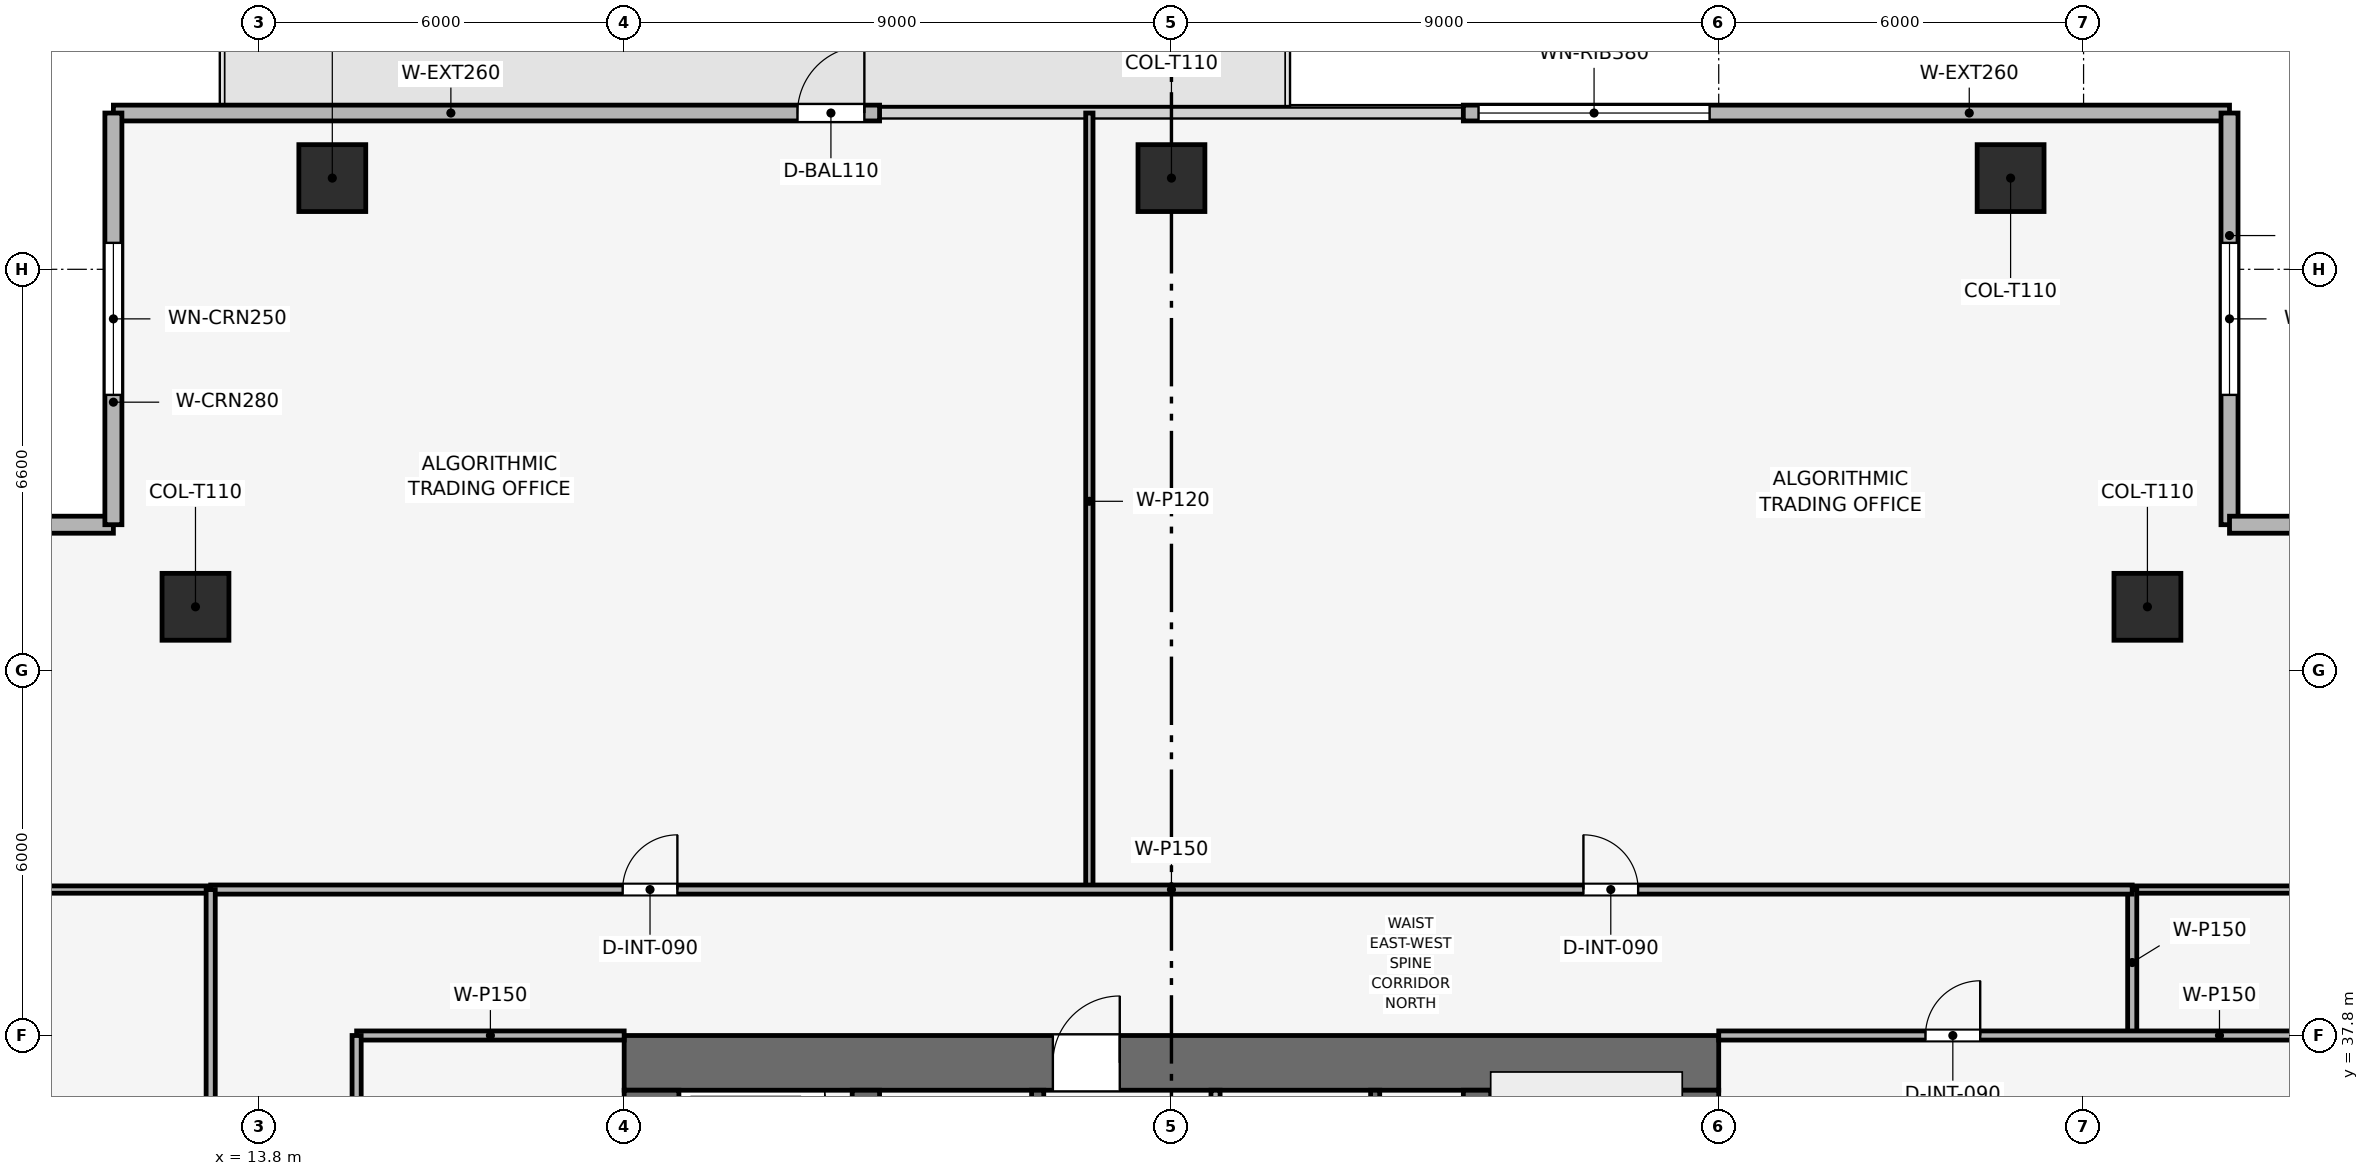
"""IFC4 building model, lengths in metres.
Left out: names, types, materials, properties, quantities, classifications, styles, units other than length and angle.
Written with IfcOpenShell. Run it as: python <this file> out.ifc"""

import sys

from ifc_helpers import new_model, si_unit, direction, frame, frame_2d, origin, origin_2d, place, context, subcontext, project, spatial, rectangle, extrude, element, fill, save


model = new_model("IFC4")
c1 = context("Model", 3, precision=1e-05, world=origin(), true_north=direction((0.0, 1.0)))
c2 = subcontext(c1, "Body", "Model", "MODEL_VIEW")
j1 = project(units=[si_unit("LENGTHUNIT", "METRE"), si_unit("PLANEANGLEUNIT", "RADIAN")], contexts=[c1])
p1 = place(None, origin())
s1 = spatial("IfcSite", under=j1, at=p1, CompositionType="ELEMENT")
p2 = place(p1, origin())
s2 = spatial("IfcBuilding", under=s1, at=p2, CompositionType="ELEMENT")
p3 = place(p2, frame((0.0, 0.0, 157.05)))
s3 = spatial("IfcBuildingStorey", under=s2, at=p3, CompositionType="ELEMENT", Elevation=157.05)
p4 = place(p3, frame((19.8, 37.35, 0.0), z_axis=(0.0, 0.0, 1.0), x_axis=(1.0, 0.0, 0.0)))
e1 = element("IfcWall", 1, at=p4, inside=s3, PredefinedType="SHEAR", context=c2, shape_type="SweptSolid", body=[
    extrude(rectangle(XDim=18.0, YDim=0.9, at=frame_2d((9.0, 0.0))), origin(), (0.0, 0.0, 1.0), 3.75),
])
p5 = place(p4, frame((7.05, 0.0, 0.0)))
e2 = element("IfcOpeningElement", 2, at=p5, cuts=e1, PredefinedType="OPENING", context=c2, shape_type="SweptSolid", body=[
    extrude(rectangle(XDim=1.1, YDim=2.15, at=frame_2d((0.55, 1.075))), frame((0.0, 0.46, 0.0), z_axis=(0.0, -1.0, 0.0), x_axis=(1.0, 0.0, 0.0)), (0.0, 0.0, 1.0), 0.92),
])
p6 = place(p3, frame((20.25, 20.7, 0.0), z_axis=(0.0, 0.0, 1.0), x_axis=(0.0, 1.0, 0.0)))
e3 = element("IfcWall", 3, at=p6, inside=s3, PredefinedType="SHEAR", context=c2, shape_type="SweptSolid", body=[
    extrude(rectangle(XDim=16.2, YDim=0.9, at=frame_2d((8.1, 0.0))), origin(), (0.0, 0.0, 1.0), 3.75),
])
p7 = place(p6, frame((10.1, 0.0, 0.0)))
e4 = element("IfcOpeningElement", 4, at=p7, cuts=e3, PredefinedType="OPENING", context=c2, shape_type="SweptSolid", body=[
    extrude(rectangle(XDim=1.1, YDim=2.15, at=frame_2d((0.55, 1.075))), frame((0.0, 0.46, 0.0), z_axis=(0.0, -1.0, 0.0), x_axis=(1.0, 0.0, 0.0)), (0.0, 0.0, 1.0), 0.92),
])
p8 = place(p3, frame((37.35, 20.7, 0.0), z_axis=(0.0, 0.0, 1.0), x_axis=(0.0, 1.0, 0.0)))
e5 = element("IfcWall", 5, at=p8, inside=s3, PredefinedType="SHEAR", context=c2, shape_type="SweptSolid", body=[
    extrude(rectangle(XDim=16.2, YDim=0.9, at=frame_2d((8.1, 0.0))), origin(), (0.0, 0.0, 1.0), 3.75),
])
p9 = place(p8, frame((4.6, 0.0, 0.0)))
e6 = element("IfcOpeningElement", 6, at=p9, cuts=e5, PredefinedType="OPENING", context=c2, shape_type="SweptSolid", body=[
    extrude(rectangle(XDim=1.1, YDim=2.15, at=frame_2d((0.55, 1.075))), frame((0.0, 0.46, 0.0), z_axis=(0.0, -1.0, 0.0), x_axis=(1.0, 0.0, 0.0)), (0.0, 0.0, 1.0), 0.92),
])
for number, where, z_axis, x_axis in (
    (7, (23.775, 20.7, 0.0), (0.0, 0.0, 1.0), (0.0, 1.0, 0.0)),
    (8, (33.825, 20.7, 0.0), (0.0, 0.0, 1.0), (0.0, 1.0, 0.0)),
):
    element("IfcWall", number, at=place(p3, frame(where, z_axis=z_axis, x_axis=x_axis)), inside=s3, PredefinedType="SHEAR", context=c2, shape_type="SweptSolid", body=[
        extrude(rectangle(XDim=16.2, YDim=0.45, at=frame_2d((8.1, 0.0))), origin(), (0.0, 0.0, 1.0), 3.75),
    ])
for number, where, z_axis, x_axis in (
    (9, (42.6, 51.9, 0.003), (0.0, 0.0, 1.0), (1.0, 0.0, 0.0)),
    (10, (28.8, 51.9, 0.003), (0.0, 0.0, 1.0), (1.0, 0.0, 0.0)),
    (11, (15.0, 51.9, 0.003), (0.0, 0.0, 1.0), (1.0, 0.0, 0.0)),
    (12, (44.85, 44.85, 0.003), (0.0, 0.0, 1.0), (1.0, 0.0, 0.0)),
    (13, (12.75, 44.85, 0.003), (0.0, 0.0, 1.0), (1.0, 0.0, 0.0)),
):
    element("IfcColumn", number, at=place(p3, frame(where, z_axis=z_axis, x_axis=x_axis)), inside=s3, PredefinedType="COLUMN", context=c2, shape_type="SweptSolid", body=[
        extrude(rectangle(XDim=1.1, YDim=1.1, at=origin_2d()), origin(), (0.0, 0.0, 1.0), 3.489),
    ])
p10 = place(p3, frame((11.4, 52.97, 0.0), z_axis=(0.0, 0.0, 1.0), x_axis=(1.0, 0.0, 0.0)))
e14 = element("IfcWall", 14, at=p10, inside=s3, PredefinedType="SOLIDWALL", context=c2, shape_type="SweptSolid", body=[
    extrude(rectangle(XDim=12.6, YDim=0.26, at=frame_2d((6.3, 0.0))), origin(), (0.0, 0.0, 1.0), 3.495),
])
p11 = place(p10, frame((11.25, 0.0, 0.0)))
e15 = element("IfcOpeningElement", 15, at=p11, cuts=e14, PredefinedType="OPENING", context=c2, shape_type="SweptSolid", body=[
    extrude(rectangle(XDim=1.1, YDim=2.2, at=frame_2d((0.55, 1.1))), frame((0.0, 0.14, 0.0), z_axis=(0.0, -1.0, 0.0), x_axis=(1.0, 0.0, 0.0)), (0.0, 0.0, 1.0), 0.28),
])
p12 = place(p3, frame((33.6, 52.97, 0.0), z_axis=(0.0, 0.0, 1.0), x_axis=(1.0, 0.0, 0.0)))
e16 = element("IfcWall", 16, at=p12, inside=s3, PredefinedType="SOLIDWALL", context=c2, shape_type="SweptSolid", body=[
    extrude(rectangle(XDim=12.6, YDim=0.26, at=frame_2d((6.3, 0.0))), origin(), (0.0, 0.0, 1.0), 3.495),
])
p13 = place(p12, frame((0.25, 0.0, 0.9)))
e17 = element("IfcOpeningElement", 17, at=p13, cuts=e16, PredefinedType="OPENING", context=c2, shape_type="SweptSolid", body=[
    extrude(rectangle(XDim=3.8, YDim=1.9, at=frame_2d((1.9, 0.95))), frame((0.0, 0.14, 0.0), z_axis=(0.0, -1.0, 0.0), x_axis=(1.0, 0.0, 0.0)), (0.0, 0.0, 1.0), 0.28),
])
p14 = place(p3, frame((4.63, 46.2, 0.0), z_axis=(0.0, 0.0, 1.0), x_axis=(1.0, 0.0, 0.0)))
e18 = element("IfcWall", 18, at=p14, inside=s3, PredefinedType="SOLIDWALL", context=c2, shape_type="SweptSolid", body=[
    extrude(rectangle(XDim=6.77, YDim=0.28, at=frame_2d((3.385, 0.0))), origin(), (0.0, 0.0, 1.0), 3.495),
])
p15 = place(p14, frame((2.135, 0.0, 0.9)))
e19 = element("IfcOpeningElement", 19, at=p15, cuts=e18, PredefinedType="OPENING", context=c2, shape_type="SweptSolid", body=[
    extrude(rectangle(XDim=2.5, YDim=1.9, at=frame_2d((1.25, 0.95))), frame((0.0, 0.15, 0.0), z_axis=(0.0, -1.0, 0.0), x_axis=(1.0, 0.0, 0.0)), (0.0, 0.0, 1.0), 0.3),
])
p16 = place(p3, frame((11.4, 46.2, 0.0), z_axis=(0.0, 0.0, 1.0), x_axis=(0.0, 1.0, 0.0)))
e20 = element("IfcWall", 20, at=p16, inside=s3, PredefinedType="SOLIDWALL", context=c2, shape_type="SweptSolid", body=[
    extrude(rectangle(XDim=6.77, YDim=0.28, at=frame_2d((3.385, 0.0))), origin(), (0.0, 0.0, 1.0), 3.495),
])
p17 = place(p16, frame((2.135, 0.0, 0.9)))
e21 = element("IfcOpeningElement", 21, at=p17, cuts=e20, PredefinedType="OPENING", context=c2, shape_type="SweptSolid", body=[
    extrude(rectangle(XDim=2.5, YDim=1.9, at=frame_2d((1.25, 0.95))), frame((0.0, 0.15, 0.0), z_axis=(0.0, -1.0, 0.0), x_axis=(1.0, 0.0, 0.0)), (0.0, 0.0, 1.0), 0.3),
])
p18 = place(p3, frame((46.2, 52.97, 0.0), z_axis=(0.0, 0.0, 1.0), x_axis=(0.0, -1.0, 0.0)))
e22 = element("IfcWall", 22, at=p18, inside=s3, PredefinedType="SOLIDWALL", context=c2, shape_type="SweptSolid", body=[
    extrude(rectangle(XDim=6.77, YDim=0.28, at=frame_2d((3.385, 0.0))), origin(), (0.0, 0.0, 1.0), 3.495),
])
p19 = place(p18, frame((2.135, 0.0, 0.9)))
e23 = element("IfcOpeningElement", 23, at=p19, cuts=e22, PredefinedType="OPENING", context=c2, shape_type="SweptSolid", body=[
    extrude(rectangle(XDim=2.5, YDim=1.9, at=frame_2d((1.25, 0.95))), frame((0.0, 0.15, 0.0), z_axis=(0.0, -1.0, 0.0), x_axis=(1.0, 0.0, 0.0)), (0.0, 0.0, 1.0), 0.3),
])
p20 = place(p3, frame((46.2, 46.2, 0.0), z_axis=(0.0, 0.0, 1.0), x_axis=(1.0, 0.0, 0.0)))
e24 = element("IfcWall", 24, at=p20, inside=s3, PredefinedType="SOLIDWALL", context=c2, shape_type="SweptSolid", body=[
    extrude(rectangle(XDim=6.77, YDim=0.28, at=frame_2d((3.385, 0.0))), origin(), (0.0, 0.0, 1.0), 3.495),
])
p21 = place(p20, frame((2.135, 0.0, 0.9)))
e25 = element("IfcOpeningElement", 25, at=p21, cuts=e24, PredefinedType="OPENING", context=c2, shape_type="SweptSolid", body=[
    extrude(rectangle(XDim=2.5, YDim=1.9, at=frame_2d((1.25, 0.95))), frame((0.0, 0.15, 0.0), z_axis=(0.0, -1.0, 0.0), x_axis=(1.0, 0.0, 0.0)), (0.0, 0.0, 1.0), 0.3),
])
p22 = place(p3, frame((32.15, 34.0, 0.0), z_axis=(0.0, 0.0, 1.0), x_axis=(0.0, 1.0, 0.0)))
e26 = element("IfcWall", 26, at=p22, inside=s3, PredefinedType="SHEAR", context=c2, shape_type="SweptSolid", body=[
    extrude(rectangle(XDim=2.9, YDim=0.15, at=frame_2d((1.45, 0.0))), origin(), (0.0, 0.0, 1.0), 3.495),
])
p23 = place(p3, frame((26.6, 34.0, 0.0), z_axis=(0.0, 0.0, 1.0), x_axis=(0.0, 1.0, 0.0)))
e27 = element("IfcWall", 27, at=p23, inside=s3, PredefinedType="SHEAR", context=c2, shape_type="SweptSolid", body=[
    extrude(rectangle(XDim=2.9, YDim=0.2, at=frame_2d((1.45, 0.0))), origin(), (0.0, 0.0, 1.0), 3.495),
])
p24 = place(p23, frame((0.75, 0.0, 0.0)))
e28 = element("IfcOpeningElement", 28, at=p24, cuts=e27, PredefinedType="OPENING", context=c2, shape_type="SweptSolid", body=[
    extrude(rectangle(XDim=1.1, YDim=2.15, at=frame_2d((0.55, 1.075))), frame((0.0, 0.11, 0.0), z_axis=(0.0, -1.0, 0.0), x_axis=(1.0, 0.0, 0.0)), (0.0, 0.0, 1.0), 0.22),
])
p25 = place(p3, frame((29.525, 33.925, 0.0), z_axis=(0.0, 0.0, 1.0), x_axis=(0.0, 1.0, 0.0)))
e29 = element("IfcWall", 29, at=p25, inside=s3, PredefinedType="PARTITIONING", context=c2, shape_type="SweptSolid", body=[
    extrude(rectangle(XDim=2.975, YDim=0.15, at=frame_2d((1.487, 0.0))), origin(), (0.0, 0.0, 1.0), 3.495),
])
p26 = place(p25, frame((0.85, 0.0, 0.0)))
e30 = element("IfcOpeningElement", 30, at=p26, cuts=e29, PredefinedType="OPENING", context=c2, shape_type="SweptSolid", body=[
    extrude(rectangle(XDim=0.9, YDim=2.1, at=frame_2d((0.45, 1.05))), frame((0.0, 0.085, 0.0), z_axis=(0.0, -1.0, 0.0), x_axis=(1.0, 0.0, 0.0)), (0.0, 0.0, 1.0), 0.17),
])
p27 = place(p3, frame((15.4, 37.8, 0.0), z_axis=(0.0, 0.0, 1.0), x_axis=(1.0, 0.0, 0.0)))
e31 = element("IfcWall", 31, at=p27, inside=s3, PredefinedType="PARTITIONING", context=c2, shape_type="SweptSolid", body=[
    extrude(rectangle(XDim=4.4, YDim=0.15, at=frame_2d((2.2, 0.0))), origin(), (0.0, 0.0, 1.0), 3.03),
])
p28 = place(p3, frame((15.4, 32.45, 0.0), z_axis=(0.0, 0.0, 1.0), x_axis=(0.0, 1.0, 0.0)))
e32 = element("IfcWall", 32, at=p28, inside=s3, PredefinedType="PARTITIONING", context=c2, shape_type="SweptSolid", body=[
    extrude(rectangle(XDim=5.35, YDim=0.15, at=frame_2d((2.675, 0.0))), origin(), (0.0, 0.0, 1.0), 3.03),
])
p29 = place(p28, frame((2.1, 0.0, 0.0)))
e33 = element("IfcOpeningElement", 33, at=p29, cuts=e32, PredefinedType="OPENING", context=c2, shape_type="SweptSolid", body=[
    extrude(rectangle(XDim=0.9, YDim=2.1, at=frame_2d((0.45, 1.05))), frame((0.0, 0.085, 0.0), z_axis=(0.0, -1.0, 0.0), x_axis=(1.0, 0.0, 0.0)), (0.0, 0.0, 1.0), 0.17),
])
p30 = place(p3, frame((27.45, 40.2, 0.0), z_axis=(0.0, 0.0, 1.0), x_axis=(0.0, 1.0, 0.0)))
e34 = element("IfcWall", 34, at=p30, inside=s3, PredefinedType="PARTITIONING", context=c2, shape_type="SweptSolid", body=[
    extrude(rectangle(XDim=12.77, YDim=0.12, at=frame_2d((6.385, 0.0))), origin(), (0.0, 0.0, 1.0), 2.98),
])
p31 = place(p3, frame((4.63, 40.2, 0.0), z_axis=(0.0, 0.0, 1.0), x_axis=(1.0, 0.0, 0.0)))
e35 = element("IfcWall", 35, at=p31, inside=s3, PredefinedType="PARTITIONING", context=c2, shape_type="SweptSolid", body=[
    extrude(rectangle(XDim=8.37, YDim=0.12, at=frame_2d((4.185, 0.0))), origin(), (0.0, 0.0, 1.0), 2.98),
])
p32 = place(p3, frame((44.6, 40.2, 0.0), z_axis=(0.0, 0.0, 1.0), x_axis=(1.0, 0.0, 0.0)))
e36 = element("IfcWall", 36, at=p32, inside=s3, PredefinedType="PARTITIONING", context=c2, shape_type="SweptSolid", body=[
    extrude(rectangle(XDim=8.37, YDim=0.12, at=frame_2d((4.185, 0.0))), origin(), (0.0, 0.0, 1.0), 2.98),
])
p33 = place(p3, frame((44.6, 37.8, 0.0), z_axis=(0.0, 0.0, 1.0), x_axis=(0.0, 1.0, 0.0)))
e37 = element("IfcWall", 37, at=p33, inside=s3, PredefinedType="PARTITIONING", context=c2, shape_type="SweptSolid", body=[
    extrude(rectangle(XDim=2.4, YDim=0.15, at=frame_2d((1.2, 0.0))), origin(), (0.0, 0.0, 1.0), 3.495),
])
p34 = place(p3, frame((37.8, 37.8, 0.0), z_axis=(0.0, 0.0, 1.0), x_axis=(1.0, 0.0, 0.0)))
e38 = element("IfcWall", 38, at=p34, inside=s3, PredefinedType="PARTITIONING", context=c2, shape_type="SweptSolid", body=[
    extrude(rectangle(XDim=15.17, YDim=0.15, at=frame_2d((7.585, 0.0))), origin(), (0.0, 0.0, 1.0), 2.98),
])
p35 = place(p34, frame((3.4, 0.0, 0.0)))
e39 = element("IfcOpeningElement", 39, at=p35, cuts=e38, PredefinedType="OPENING", context=c2, shape_type="SweptSolid", body=[
    extrude(rectangle(XDim=0.9, YDim=2.1, at=frame_2d((0.45, 1.05))), frame((0.0, 0.085, 0.0), z_axis=(0.0, -1.0, 0.0), x_axis=(1.0, 0.0, 0.0)), (0.0, 0.0, 1.0), 0.17),
])
p36 = place(p3, frame((13.0, 40.2, 0.0), z_axis=(0.0, 0.0, 1.0), x_axis=(1.0, 0.0, 0.0)))
e40 = element("IfcWall", 40, at=p36, inside=s3, PredefinedType="PARTITIONING", context=c2, shape_type="SweptSolid", body=[
    extrude(rectangle(XDim=31.6, YDim=0.15, at=frame_2d((15.8, 0.0))), origin(), (0.0, 0.0, 1.0), 3.03),
])
p37 = place(p36, frame((6.775, 0.0, 0.0)))
e41 = element("IfcOpeningElement", 41, at=p37, cuts=e40, PredefinedType="OPENING", context=c2, shape_type="SweptSolid", body=[
    extrude(rectangle(XDim=0.9, YDim=2.1, at=frame_2d((0.45, 1.05))), frame((0.0, 0.085, 0.0), z_axis=(0.0, -1.0, 0.0), x_axis=(1.0, 0.0, 0.0)), (0.0, 0.0, 1.0), 0.17),
])
p38 = place(p36, frame((22.575, 0.0, 0.0)))
e42 = element("IfcOpeningElement", 42, at=p38, cuts=e40, PredefinedType="OPENING", context=c2, shape_type="SweptSolid", body=[
    extrude(rectangle(XDim=0.9, YDim=2.1, at=frame_2d((0.45, 1.05))), frame((0.0, 0.085, 0.0), z_axis=(0.0, -1.0, 0.0), x_axis=(1.0, 0.0, 0.0)), (0.0, 0.0, 1.0), 0.17),
])
p39 = place(p3, frame((13.0, 17.4, 0.0), z_axis=(0.0, 0.0, 1.0), x_axis=(0.0, 1.0, 0.0)))
e43 = element("IfcWall", 43, at=p39, inside=s3, PredefinedType="PARTITIONING", context=c2, shape_type="SweptSolid", body=[
    extrude(rectangle(XDim=22.8, YDim=0.15, at=frame_2d((11.4, 0.0))), origin(), (0.0, 0.0, 1.0), 3.03),
])
p40 = place(p39, frame((10.95, 0.0, 0.0)))
e44 = element("IfcOpeningElement", 44, at=p40, cuts=e43, PredefinedType="OPENING", context=c2, shape_type="SweptSolid", body=[
    extrude(rectangle(XDim=0.9, YDim=2.1, at=frame_2d((0.45, 1.05))), frame((0.0, 0.085, 0.0), z_axis=(0.0, -1.0, 0.0), x_axis=(1.0, 0.0, 0.0)), (0.0, 0.0, 1.0), 0.17),
])
p41 = place(p11, origin())
e45 = element("IfcDoor", 45, at=p41, inside=s3, OperationType="SINGLE_SWING_RIGHT", PredefinedType="DOOR", context=c2, shape_type="SweptSolid", body=[
    extrude(rectangle(XDim=1.1, YDim=2.2, at=frame_2d((0.55, 1.1))), frame((0.0, 0.025, 0.0), z_axis=(0.0, -1.0, 0.0), x_axis=(1.0, 0.0, 0.0)), (0.0, 0.0, 1.0), 0.05),
])
fill(e15, e45)
p42 = place(p13, origin())
e46 = element("IfcWindow", 46, at=p42, inside=s3, PartitioningType="SINGLE_PANEL", PredefinedType="WINDOW", context=c2, shape_type="SweptSolid", body=[
    extrude(rectangle(XDim=3.8, YDim=1.9, at=frame_2d((1.9, 0.95))), frame((0.0, 0.03, 0.0), z_axis=(0.0, -1.0, 0.0), x_axis=(1.0, 0.0, 0.0)), (0.0, 0.0, 1.0), 0.06),
])
fill(e17, e46)
p43 = place(p17, origin())
e47 = element("IfcWindow", 47, at=p43, inside=s3, PartitioningType="SINGLE_PANEL", PredefinedType="WINDOW", context=c2, shape_type="SweptSolid", body=[
    extrude(rectangle(XDim=2.5, YDim=1.9, at=frame_2d((1.25, 0.95))), frame((0.0, 0.03, 0.0), z_axis=(0.0, -1.0, 0.0), x_axis=(1.0, 0.0, 0.0)), (0.0, 0.0, 1.0), 0.06),
])
fill(e21, e47)
p44 = place(p19, origin())
e48 = element("IfcWindow", 48, at=p44, inside=s3, PartitioningType="SINGLE_PANEL", PredefinedType="WINDOW", context=c2, shape_type="SweptSolid", body=[
    extrude(rectangle(XDim=2.5, YDim=1.9, at=frame_2d((1.25, 0.95))), frame((0.0, 0.03, 0.0), z_axis=(0.0, -1.0, 0.0), x_axis=(1.0, 0.0, 0.0)), (0.0, 0.0, 1.0), 0.06),
])
fill(e23, e48)
p45 = place(p35, origin())
e49 = element("IfcDoor", 49, at=p45, inside=s3, OperationType="SINGLE_SWING_RIGHT", PredefinedType="DOOR", context=c2, shape_type="SweptSolid", body=[
    extrude(rectangle(XDim=0.9, YDim=2.1, at=frame_2d((0.45, 1.05))), frame((0.0, 0.025, 0.0), z_axis=(0.0, -1.0, 0.0), x_axis=(1.0, 0.0, 0.0)), (0.0, 0.0, 1.0), 0.05),
])
fill(e39, e49)
p46 = place(p37, origin())
e50 = element("IfcDoor", 50, at=p46, inside=s3, OperationType="SINGLE_SWING_RIGHT", PredefinedType="DOOR", context=c2, shape_type="SweptSolid", body=[
    extrude(rectangle(XDim=0.9, YDim=2.1, at=frame_2d((0.45, 1.05))), frame((0.0, 0.025, 0.0), z_axis=(0.0, -1.0, 0.0), x_axis=(1.0, 0.0, 0.0)), (0.0, 0.0, 1.0), 0.05),
])
fill(e41, e50)
p47 = place(p38, origin())
e51 = element("IfcDoor", 51, at=p47, inside=s3, OperationType="SINGLE_SWING_LEFT", PredefinedType="DOOR", context=c2, shape_type="SweptSolid", body=[
    extrude(rectangle(XDim=0.9, YDim=2.1, at=frame_2d((0.45, 1.05))), frame((0.0, 0.025, 0.0), z_axis=(0.0, -1.0, 0.0), x_axis=(1.0, 0.0, 0.0)), (0.0, 0.0, 1.0), 0.05),
])
fill(e42, e51)
p48 = place(p5, origin())
e52 = element("IfcDoor", 52, at=p48, inside=s3, OperationType="SINGLE_SWING_RIGHT", PredefinedType="DOOR", context=c2, shape_type="SweptSolid", body=[
    extrude(rectangle(XDim=1.1, YDim=2.15, at=frame_2d((0.55, 1.075))), frame((0.0, 0.025, 0.0), z_axis=(0.0, -1.0, 0.0), x_axis=(1.0, 0.0, 0.0)), (0.0, 0.0, 1.0), 0.05),
])
fill(e2, e52)
save(model, sys.argv[1])
